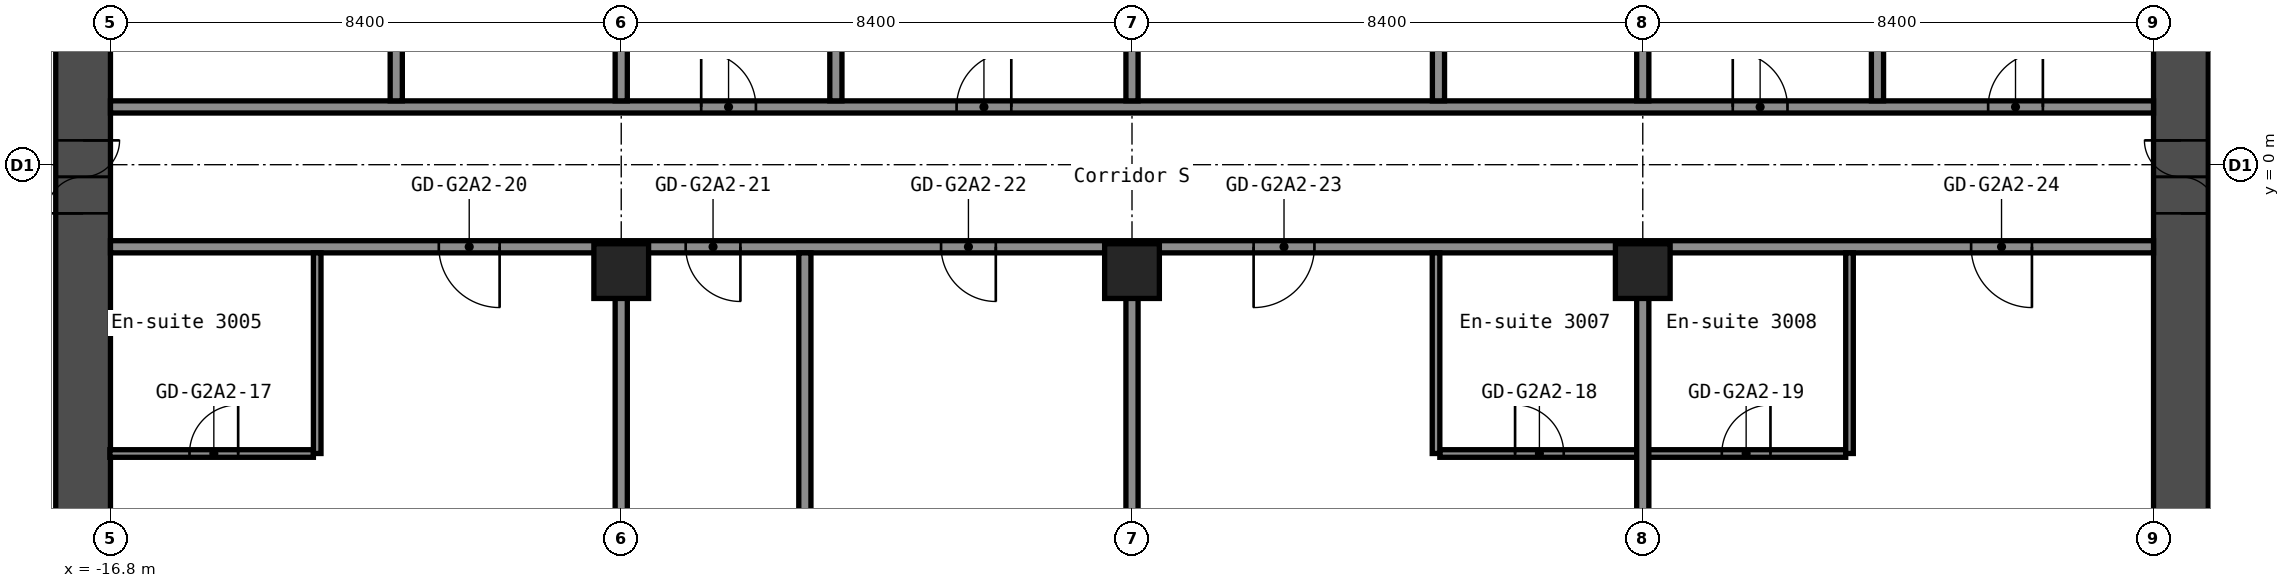
"""IFC4 building model, lengths in metres.
Left out: names, types, materials, properties, quantities, classifications, styles, units other than length and angle.
Written with IfcOpenShell. Run it as: python <this file> out.ifc"""

import sys

from ifc_helpers import new_model, si_unit, direction, frame, frame_2d, origin, origin_2d, place, context, subcontext, project, spatial, rectangle, hollow_rectangle, extrude, element, fill, save


model = new_model("IFC4")
c1 = context("Model", 3, precision=1e-05, world=origin(), true_north=direction((0.0, 1.0)))
c2 = subcontext(c1, "Body", "Model", "MODEL_VIEW")
j1 = project(units=[si_unit("LENGTHUNIT", "METRE"), si_unit("PLANEANGLEUNIT", "RADIAN")], contexts=[c1])
p1 = place(None, origin())
s1 = spatial("IfcSite", under=j1, at=p1, CompositionType="ELEMENT")
p2 = place(p1, origin())
s2 = spatial("IfcBuilding", under=s1, at=p2, CompositionType="ELEMENT")
p3 = place(p2, frame((0.0, 0.0, 107.4)))
s3 = spatial("IfcBuildingStorey", under=s2, at=p3, CompositionType="ELEMENT", Elevation=107.4)
for number, where, z_axis, x_axis in (
    (1, (-8.4, -1.75, 0.0), (0.0, 0.0, 1.0), (1.0, 0.0, 0.0)),
    (2, (0.0, -1.75, 0.0), (0.0, 0.0, 1.0), (1.0, 0.0, 0.0)),
    (3, (8.4, -1.75, 0.0), (0.0, 0.0, 1.0), (1.0, 0.0, 0.0)),
):
    element("IfcColumn", number, at=place(p3, frame(where, z_axis=z_axis, x_axis=x_axis)), inside=s3, PredefinedType="COLUMN", context=c2, shape_type="SweptSolid", body=[
        extrude(hollow_rectangle(XDim=0.9, YDim=0.9, WallThickness=0.036, at=origin_2d()), origin(), (0.0, 0.0, 1.0), 2.8),
    ])
p4 = place(p3, frame((-17.25, -8.4, 0.0), z_axis=(0.0, 0.0, 1.0), x_axis=(0.0, 1.0, 0.0)))
e4 = element("IfcWall", 4, at=p4, inside=s3, PredefinedType="SHEAR", context=c2, shape_type="SweptSolid", body=[
    extrude(rectangle(XDim=16.8, YDim=0.9, at=frame_2d((8.4, 0.0))), origin(), (0.0, 0.0, 1.0), 2.8),
])
p5 = place(p4, frame((7.6, 0.0, 0.0)))
e5 = element("IfcOpeningElement", 5, at=p5, cuts=e4, PredefinedType="OPENING", context=c2, shape_type="SweptSolid", body=[
    extrude(rectangle(XDim=1.2, YDim=2.1, at=frame_2d((0.6, 1.05))), frame((0.0, 0.46, 0.0), z_axis=(0.0, -1.0, 0.0), x_axis=(1.0, 0.0, 0.0)), (0.0, 0.0, 1.0), 0.92),
])
p6 = place(p3, frame((17.25, -8.4, 0.0), z_axis=(0.0, 0.0, 1.0), x_axis=(0.0, 1.0, 0.0)))
e6 = element("IfcWall", 6, at=p6, inside=s3, PredefinedType="SHEAR", context=c2, shape_type="SweptSolid", body=[
    extrude(rectangle(XDim=16.8, YDim=0.9, at=frame_2d((8.4, 0.0))), origin(), (0.0, 0.0, 1.0), 2.8),
])
p7 = place(p6, frame((7.6, 0.0, 0.0)))
e7 = element("IfcOpeningElement", 7, at=p7, cuts=e6, PredefinedType="OPENING", context=c2, shape_type="SweptSolid", body=[
    extrude(rectangle(XDim=1.2, YDim=2.1, at=frame_2d((0.6, 1.05))), frame((0.0, 0.46, 0.0), z_axis=(0.0, -1.0, 0.0), x_axis=(1.0, 0.0, 0.0)), (0.0, 0.0, 1.0), 0.92),
])
p8 = place(p3, frame((-16.81, -4.75, 0.0), z_axis=(0.0, 0.0, 1.0), x_axis=(1.0, 0.0, 0.0)))
e8 = element("IfcWall", 8, at=p8, inside=s3, PredefinedType="PARTITIONING", context=c2, shape_type="SweptSolid", body=[
    extrude(rectangle(XDim=3.348, YDim=0.125, at=frame_2d((1.674, 0.0))), origin(), (0.0, 0.0, 1.0), 2.8),
])
p9 = place(p8, frame((1.31, 0.0, 0.0)))
e9 = element("IfcOpeningElement", 9, at=p9, cuts=e8, PredefinedType="OPENING", context=c2, shape_type="SweptSolid", body=[
    extrude(rectangle(XDim=0.8, YDim=2.1, at=frame_2d((0.4, 1.05))), frame((0.0, 0.073, 0.0), z_axis=(0.0, -1.0, 0.0), x_axis=(1.0, 0.0, 0.0)), (0.0, 0.0, 1.0), 0.145),
])
p10 = place(p3, frame((5.062, -4.75, 0.0), z_axis=(0.0, 0.0, 1.0), x_axis=(1.0, 0.0, 0.0)))
e10 = element("IfcWall", 10, at=p10, inside=s3, PredefinedType="PARTITIONING", context=c2, shape_type="SweptSolid", body=[
    extrude(rectangle(XDim=6.675, YDim=0.125, at=frame_2d((3.337, 0.0))), origin(), (0.0, 0.0, 1.0), 2.8),
])
p11 = place(p10, frame((1.238, 0.0, 0.0)))
e11 = element("IfcOpeningElement", 11, at=p11, cuts=e10, PredefinedType="OPENING", context=c2, shape_type="SweptSolid", body=[
    extrude(rectangle(XDim=0.8, YDim=2.1, at=frame_2d((0.4, 1.05))), frame((0.0, 0.073, 0.0), z_axis=(0.0, -1.0, 0.0), x_axis=(1.0, 0.0, 0.0)), (0.0, 0.0, 1.0), 0.145),
])
p12 = place(p10, frame((4.637, 0.0, 0.0)))
e12 = element("IfcOpeningElement", 12, at=p12, cuts=e10, PredefinedType="OPENING", context=c2, shape_type="SweptSolid", body=[
    extrude(rectangle(XDim=0.8, YDim=2.1, at=frame_2d((0.4, 1.05))), frame((0.0, 0.073, 0.0), z_axis=(0.0, -1.0, 0.0), x_axis=(1.0, 0.0, 0.0)), (0.0, 0.0, 1.0), 0.145),
])
p13 = place(p3, frame((-16.8, -1.35, 0.0), z_axis=(0.0, 0.0, 1.0), x_axis=(1.0, 0.0, 0.0)))
e13 = element("IfcWall", 13, at=p13, inside=s3, PredefinedType="PARTITIONING", context=c2, shape_type="SweptSolid", body=[
    extrude(rectangle(XDim=33.6, YDim=0.2, at=frame_2d((16.8, 0.0))), origin(), (0.0, 0.0, 1.0), 2.8),
])
p14 = place(p13, frame((5.4, 0.0, 0.0)))
e14 = element("IfcOpeningElement", 14, at=p14, cuts=e13, PredefinedType="OPENING", context=c2, shape_type="SweptSolid", body=[
    extrude(rectangle(XDim=1.0, YDim=2.1, at=frame_2d((0.5, 1.05))), frame((0.0, 0.11, 0.0), z_axis=(0.0, -1.0, 0.0), x_axis=(1.0, 0.0, 0.0)), (0.0, 0.0, 1.0), 0.22),
])
p15 = place(p13, frame((9.46, 0.0, 0.0)))
e15 = element("IfcOpeningElement", 15, at=p15, cuts=e13, PredefinedType="OPENING", context=c2, shape_type="SweptSolid", body=[
    extrude(rectangle(XDim=0.9, YDim=2.1, at=frame_2d((0.45, 1.05))), frame((0.0, 0.11, 0.0), z_axis=(0.0, -1.0, 0.0), x_axis=(1.0, 0.0, 0.0)), (0.0, 0.0, 1.0), 0.22),
])
p16 = place(p13, frame((13.66, 0.0, 0.0)))
e16 = element("IfcOpeningElement", 16, at=p16, cuts=e13, PredefinedType="OPENING", context=c2, shape_type="SweptSolid", body=[
    extrude(rectangle(XDim=0.9, YDim=2.1, at=frame_2d((0.45, 1.05))), frame((0.0, 0.11, 0.0), z_axis=(0.0, -1.0, 0.0), x_axis=(1.0, 0.0, 0.0)), (0.0, 0.0, 1.0), 0.22),
])
p17 = place(p13, frame((18.8, 0.0, 0.0)))
e17 = element("IfcOpeningElement", 17, at=p17, cuts=e13, PredefinedType="OPENING", context=c2, shape_type="SweptSolid", body=[
    extrude(rectangle(XDim=1.0, YDim=2.1, at=frame_2d((0.5, 1.05))), frame((0.0, 0.11, 0.0), z_axis=(0.0, -1.0, 0.0), x_axis=(1.0, 0.0, 0.0)), (0.0, 0.0, 1.0), 0.22),
])
p18 = place(p13, frame((30.6, 0.0, 0.0)))
e18 = element("IfcOpeningElement", 18, at=p18, cuts=e13, PredefinedType="OPENING", context=c2, shape_type="SweptSolid", body=[
    extrude(rectangle(XDim=1.0, YDim=2.1, at=frame_2d((0.5, 1.05))), frame((0.0, 0.11, 0.0), z_axis=(0.0, -1.0, 0.0), x_axis=(1.0, 0.0, 0.0)), (0.0, 0.0, 1.0), 0.22),
])
p19 = place(p3, frame((-16.8, 0.95, 0.0), z_axis=(0.0, 0.0, 1.0), x_axis=(1.0, 0.0, 0.0)))
e19 = element("IfcWall", 19, at=p19, inside=s3, PredefinedType="PARTITIONING", context=c2, shape_type="SweptSolid", body=[
    extrude(rectangle(XDim=33.6, YDim=0.2, at=frame_2d((16.8, 0.0))), origin(), (0.0, 0.0, 1.0), 2.8),
])
p20 = place(p19, frame((9.715, 0.0, 0.0)))
e20 = element("IfcOpeningElement", 20, at=p20, cuts=e19, PredefinedType="OPENING", context=c2, shape_type="SweptSolid", body=[
    extrude(rectangle(XDim=0.9, YDim=2.1, at=frame_2d((0.45, 1.05))), frame((0.0, 0.11, 0.0), z_axis=(0.0, -1.0, 0.0), x_axis=(1.0, 0.0, 0.0)), (0.0, 0.0, 1.0), 0.22),
])
p21 = place(p19, frame((13.915, 0.0, 0.0)))
e21 = element("IfcOpeningElement", 21, at=p21, cuts=e19, PredefinedType="OPENING", context=c2, shape_type="SweptSolid", body=[
    extrude(rectangle(XDim=0.9, YDim=2.1, at=frame_2d((0.45, 1.05))), frame((0.0, 0.11, 0.0), z_axis=(0.0, -1.0, 0.0), x_axis=(1.0, 0.0, 0.0)), (0.0, 0.0, 1.0), 0.22),
])
p22 = place(p19, frame((26.68, 0.0, 0.0)))
e22 = element("IfcOpeningElement", 22, at=p22, cuts=e19, PredefinedType="OPENING", context=c2, shape_type="SweptSolid", body=[
    extrude(rectangle(XDim=0.9, YDim=2.1, at=frame_2d((0.45, 1.05))), frame((0.0, 0.11, 0.0), z_axis=(0.0, -1.0, 0.0), x_axis=(1.0, 0.0, 0.0)), (0.0, 0.0, 1.0), 0.22),
])
p23 = place(p19, frame((30.88, 0.0, 0.0)))
e23 = element("IfcOpeningElement", 23, at=p23, cuts=e19, PredefinedType="OPENING", context=c2, shape_type="SweptSolid", body=[
    extrude(rectangle(XDim=0.9, YDim=2.1, at=frame_2d((0.45, 1.05))), frame((0.0, 0.11, 0.0), z_axis=(0.0, -1.0, 0.0), x_axis=(1.0, 0.0, 0.0)), (0.0, 0.0, 1.0), 0.22),
])
p24 = place(p3, frame((-13.4, -4.75, 0.0), z_axis=(0.0, 0.0, 1.0), x_axis=(0.0, 1.0, 0.0)))
e24 = element("IfcWall", 24, at=p24, inside=s3, PredefinedType="PARTITIONING", context=c2, shape_type="SweptSolid", body=[
    extrude(rectangle(XDim=3.3, YDim=0.125, at=frame_2d((1.65, 0.0))), origin(), (0.0, 0.0, 1.0), 2.8),
])
p25 = place(p3, frame((-12.1, 1.05, 0.0), z_axis=(0.0, 0.0, 1.0), x_axis=(0.0, 1.0, 0.0)))
e25 = element("IfcWall", 25, at=p25, inside=s3, PredefinedType="PARTITIONING", context=c2, shape_type="SweptSolid", body=[
    extrude(rectangle(XDim=5.9, YDim=0.2, at=frame_2d((2.95, 0.0))), origin(), (0.0, 0.0, 1.0), 2.8),
])
p26 = place(p3, frame((-8.4, -15.55, 0.0), z_axis=(0.0, 0.0, 1.0), x_axis=(0.0, 1.0, 0.0)))
e26 = element("IfcWall", 26, at=p26, inside=s3, PredefinedType="PARTITIONING", context=c2, shape_type="SweptSolid", body=[
    extrude(rectangle(XDim=13.36, YDim=0.2, at=frame_2d((6.68, 0.0))), origin(), (0.0, 0.0, 1.0), 2.8),
])
p27 = place(p3, frame((-8.4, 1.05, 0.0), z_axis=(0.0, 0.0, 1.0), x_axis=(0.0, 1.0, 0.0)))
e27 = element("IfcWall", 27, at=p27, inside=s3, PredefinedType="PARTITIONING", context=c2, shape_type="SweptSolid", body=[
    extrude(rectangle(XDim=5.9, YDim=0.2, at=frame_2d((2.95, 0.0))), origin(), (0.0, 0.0, 1.0), 2.8),
])
p28 = place(p3, frame((-5.38, -15.55, 0.0), z_axis=(0.0, 0.0, 1.0), x_axis=(0.0, 1.0, 0.0)))
e28 = element("IfcWall", 28, at=p28, inside=s3, PredefinedType="PARTITIONING", context=c2, shape_type="SweptSolid", body=[
    extrude(rectangle(XDim=14.1, YDim=0.2, at=frame_2d((7.05, 0.0))), origin(), (0.0, 0.0, 1.0), 2.8),
])
p29 = place(p3, frame((-4.87, 1.05, 0.0), z_axis=(0.0, 0.0, 1.0), x_axis=(0.0, 1.0, 0.0)))
e29 = element("IfcWall", 29, at=p29, inside=s3, PredefinedType="PARTITIONING", context=c2, shape_type="SweptSolid", body=[
    extrude(rectangle(XDim=5.9, YDim=0.2, at=frame_2d((2.95, 0.0))), origin(), (0.0, 0.0, 1.0), 2.8),
])
p30 = place(p3, frame((0.0, -15.55, 0.0), z_axis=(0.0, 0.0, 1.0), x_axis=(0.0, 1.0, 0.0)))
e30 = element("IfcWall", 30, at=p30, inside=s3, PredefinedType="PARTITIONING", context=c2, shape_type="SweptSolid", body=[
    extrude(rectangle(XDim=13.36, YDim=0.2, at=frame_2d((6.68, 0.0))), origin(), (0.0, 0.0, 1.0), 2.8),
])
p31 = place(p3, frame((0.0, 1.05, 0.0), z_axis=(0.0, 0.0, 1.0), x_axis=(0.0, 1.0, 0.0)))
e31 = element("IfcWall", 31, at=p31, inside=s3, PredefinedType="PARTITIONING", context=c2, shape_type="SweptSolid", body=[
    extrude(rectangle(XDim=5.9, YDim=0.2, at=frame_2d((2.95, 0.0))), origin(), (0.0, 0.0, 1.0), 2.8),
])
p32 = place(p3, frame((5.0, -4.75, 0.0), z_axis=(0.0, 0.0, 1.0), x_axis=(0.0, 1.0, 0.0)))
e32 = element("IfcWall", 32, at=p32, inside=s3, PredefinedType="PARTITIONING", context=c2, shape_type="SweptSolid", body=[
    extrude(rectangle(XDim=3.3, YDim=0.125, at=frame_2d((1.65, 0.0))), origin(), (0.0, 0.0, 1.0), 2.8),
])
p33 = place(p3, frame((5.04, 1.05, 0.0), z_axis=(0.0, 0.0, 1.0), x_axis=(0.0, 1.0, 0.0)))
e33 = element("IfcWall", 33, at=p33, inside=s3, PredefinedType="PARTITIONING", context=c2, shape_type="SweptSolid", body=[
    extrude(rectangle(XDim=5.9, YDim=0.2, at=frame_2d((2.95, 0.0))), origin(), (0.0, 0.0, 1.0), 2.8),
])
p34 = place(p3, frame((8.4, -15.55, 0.0), z_axis=(0.0, 0.0, 1.0), x_axis=(0.0, 1.0, 0.0)))
e34 = element("IfcWall", 34, at=p34, inside=s3, PredefinedType="PARTITIONING", context=c2, shape_type="SweptSolid", body=[
    extrude(rectangle(XDim=13.36, YDim=0.2, at=frame_2d((6.68, 0.0))), origin(), (0.0, 0.0, 1.0), 2.8),
])
p35 = place(p3, frame((8.4, 1.05, 0.0), z_axis=(0.0, 0.0, 1.0), x_axis=(0.0, 1.0, 0.0)))
e35 = element("IfcWall", 35, at=p35, inside=s3, PredefinedType="PARTITIONING", context=c2, shape_type="SweptSolid", body=[
    extrude(rectangle(XDim=5.9, YDim=0.2, at=frame_2d((2.95, 0.0))), origin(), (0.0, 0.0, 1.0), 2.8),
])
p36 = place(p3, frame((11.8, -4.75, 0.0), z_axis=(0.0, 0.0, 1.0), x_axis=(0.0, 1.0, 0.0)))
e36 = element("IfcWall", 36, at=p36, inside=s3, PredefinedType="PARTITIONING", context=c2, shape_type="SweptSolid", body=[
    extrude(rectangle(XDim=3.3, YDim=0.125, at=frame_2d((1.65, 0.0))), origin(), (0.0, 0.0, 1.0), 2.8),
])
p37 = place(p3, frame((12.26, 1.05, 0.0), z_axis=(0.0, 0.0, 1.0), x_axis=(0.0, 1.0, 0.0)))
e37 = element("IfcWall", 37, at=p37, inside=s3, PredefinedType="PARTITIONING", context=c2, shape_type="SweptSolid", body=[
    extrude(rectangle(XDim=5.9, YDim=0.2, at=frame_2d((2.95, 0.0))), origin(), (0.0, 0.0, 1.0), 2.8),
])
p38 = place(p5, origin())
e38 = element("IfcDoor", 38, at=p38, inside=s3, OperationType="DOUBLE_DOOR_SINGLE_SWING", PredefinedType="DOOR", context=c2, shape_type="SweptSolid", body=[
    extrude(rectangle(XDim=1.2, YDim=2.1, at=frame_2d((0.6, 1.05))), frame((0.0, 0.025, 0.0), z_axis=(0.0, -1.0, 0.0), x_axis=(1.0, 0.0, 0.0)), (0.0, 0.0, 1.0), 0.05),
])
fill(e5, e38)
p39 = place(p7, origin())
e39 = element("IfcDoor", 39, at=p39, inside=s3, OperationType="DOUBLE_DOOR_SINGLE_SWING", PredefinedType="DOOR", context=c2, shape_type="SweptSolid", body=[
    extrude(rectangle(XDim=1.2, YDim=2.1, at=frame_2d((0.6, 1.05))), frame((0.0, 0.025, 0.0), z_axis=(0.0, -1.0, 0.0), x_axis=(1.0, 0.0, 0.0)), (0.0, 0.0, 1.0), 0.05),
])
fill(e7, e39)
p40 = place(p9, origin())
e40 = element("IfcDoor", 40, at=p40, inside=s3, OperationType="SINGLE_SWING_LEFT", PredefinedType="DOOR", context=c2, shape_type="SweptSolid", body=[
    extrude(rectangle(XDim=0.8, YDim=2.1, at=frame_2d((0.4, 1.05))), frame((0.0, 0.025, 0.0), z_axis=(0.0, -1.0, 0.0), x_axis=(1.0, 0.0, 0.0)), (0.0, 0.0, 1.0), 0.05),
])
fill(e9, e40)
p41 = place(p11, origin())
e41 = element("IfcDoor", 41, at=p41, inside=s3, OperationType="SINGLE_SWING_RIGHT", PredefinedType="DOOR", context=c2, shape_type="SweptSolid", body=[
    extrude(rectangle(XDim=0.8, YDim=2.1, at=frame_2d((0.4, 1.05))), frame((0.0, 0.025, 0.0), z_axis=(0.0, -1.0, 0.0), x_axis=(1.0, 0.0, 0.0)), (0.0, 0.0, 1.0), 0.05),
])
fill(e11, e41)
p42 = place(p12, origin())
e42 = element("IfcDoor", 42, at=p42, inside=s3, OperationType="SINGLE_SWING_LEFT", PredefinedType="DOOR", context=c2, shape_type="SweptSolid", body=[
    extrude(rectangle(XDim=0.8, YDim=2.1, at=frame_2d((0.4, 1.05))), frame((0.0, 0.025, 0.0), z_axis=(0.0, -1.0, 0.0), x_axis=(1.0, 0.0, 0.0)), (0.0, 0.0, 1.0), 0.05),
])
fill(e12, e42)
p43 = place(p14, origin())
e43 = element("IfcDoor", 43, at=p43, inside=s3, OperationType="SINGLE_SWING_RIGHT", PredefinedType="DOOR", context=c2, shape_type="SweptSolid", body=[
    extrude(rectangle(XDim=1.0, YDim=2.1, at=frame_2d((0.5, 1.05))), frame((0.0, 0.025, 0.0), z_axis=(0.0, -1.0, 0.0), x_axis=(1.0, 0.0, 0.0)), (0.0, 0.0, 1.0), 0.05),
])
fill(e14, e43)
p44 = place(p15, origin())
e44 = element("IfcDoor", 44, at=p44, inside=s3, OperationType="SINGLE_SWING_RIGHT", PredefinedType="DOOR", context=c2, shape_type="SweptSolid", body=[
    extrude(rectangle(XDim=0.9, YDim=2.1, at=frame_2d((0.45, 1.05))), frame((0.0, 0.025, 0.0), z_axis=(0.0, -1.0, 0.0), x_axis=(1.0, 0.0, 0.0)), (0.0, 0.0, 1.0), 0.05),
])
fill(e15, e44)
p45 = place(p16, origin())
e45 = element("IfcDoor", 45, at=p45, inside=s3, OperationType="SINGLE_SWING_RIGHT", PredefinedType="DOOR", context=c2, shape_type="SweptSolid", body=[
    extrude(rectangle(XDim=0.9, YDim=2.1, at=frame_2d((0.45, 1.05))), frame((0.0, 0.025, 0.0), z_axis=(0.0, -1.0, 0.0), x_axis=(1.0, 0.0, 0.0)), (0.0, 0.0, 1.0), 0.05),
])
fill(e16, e45)
p46 = place(p17, origin())
e46 = element("IfcDoor", 46, at=p46, inside=s3, OperationType="SINGLE_SWING_LEFT", PredefinedType="DOOR", context=c2, shape_type="SweptSolid", body=[
    extrude(rectangle(XDim=1.0, YDim=2.1, at=frame_2d((0.5, 1.05))), frame((0.0, 0.025, 0.0), z_axis=(0.0, -1.0, 0.0), x_axis=(1.0, 0.0, 0.0)), (0.0, 0.0, 1.0), 0.05),
])
fill(e17, e46)
p47 = place(p18, origin())
e47 = element("IfcDoor", 47, at=p47, inside=s3, OperationType="SINGLE_SWING_RIGHT", PredefinedType="DOOR", context=c2, shape_type="SweptSolid", body=[
    extrude(rectangle(XDim=1.0, YDim=2.1, at=frame_2d((0.5, 1.05))), frame((0.0, 0.025, 0.0), z_axis=(0.0, -1.0, 0.0), x_axis=(1.0, 0.0, 0.0)), (0.0, 0.0, 1.0), 0.05),
])
fill(e18, e47)
p48 = place(p20, origin())
e48 = element("IfcDoor", 48, at=p48, inside=s3, OperationType="SINGLE_SWING_RIGHT", PredefinedType="DOOR", context=c2, shape_type="SweptSolid", body=[
    extrude(rectangle(XDim=0.9, YDim=2.1, at=frame_2d((0.45, 1.05))), frame((0.0, 0.025, 0.0), z_axis=(0.0, -1.0, 0.0), x_axis=(1.0, 0.0, 0.0)), (0.0, 0.0, 1.0), 0.05),
])
fill(e20, e48)
p49 = place(p21, origin())
e49 = element("IfcDoor", 49, at=p49, inside=s3, OperationType="SINGLE_SWING_LEFT", PredefinedType="DOOR", context=c2, shape_type="SweptSolid", body=[
    extrude(rectangle(XDim=0.9, YDim=2.1, at=frame_2d((0.45, 1.05))), frame((0.0, 0.025, 0.0), z_axis=(0.0, -1.0, 0.0), x_axis=(1.0, 0.0, 0.0)), (0.0, 0.0, 1.0), 0.05),
])
fill(e21, e49)
p50 = place(p22, origin())
e50 = element("IfcDoor", 50, at=p50, inside=s3, OperationType="SINGLE_SWING_RIGHT", PredefinedType="DOOR", context=c2, shape_type="SweptSolid", body=[
    extrude(rectangle(XDim=0.9, YDim=2.1, at=frame_2d((0.45, 1.05))), frame((0.0, 0.025, 0.0), z_axis=(0.0, -1.0, 0.0), x_axis=(1.0, 0.0, 0.0)), (0.0, 0.0, 1.0), 0.05),
])
fill(e22, e50)
p51 = place(p23, origin())
e51 = element("IfcDoor", 51, at=p51, inside=s3, OperationType="SINGLE_SWING_LEFT", PredefinedType="DOOR", context=c2, shape_type="SweptSolid", body=[
    extrude(rectangle(XDim=0.9, YDim=2.1, at=frame_2d((0.45, 1.05))), frame((0.0, 0.025, 0.0), z_axis=(0.0, -1.0, 0.0), x_axis=(1.0, 0.0, 0.0)), (0.0, 0.0, 1.0), 0.05),
])
fill(e23, e51)
save(model, sys.argv[1])
